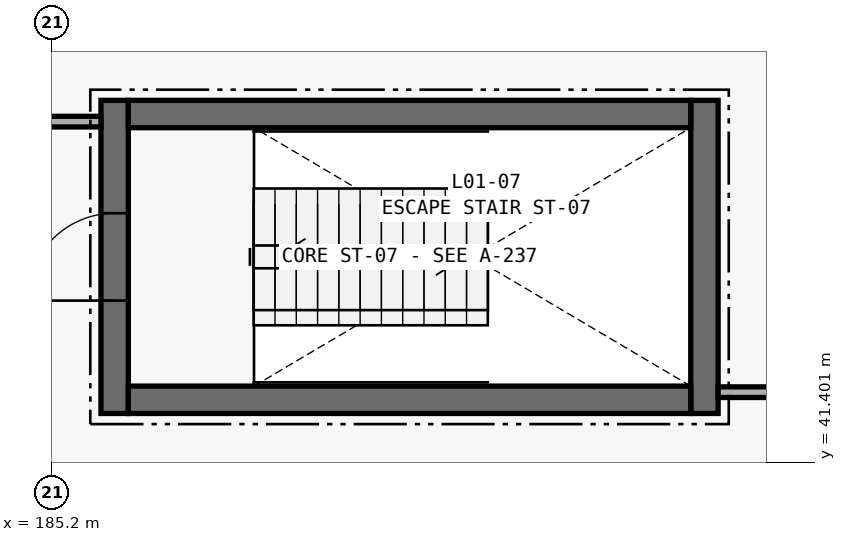
"""IFC4 building model, lengths in metres.
Left out: names, types, materials, properties, quantities, classifications, styles, units other than length and angle.
Written with IfcOpenShell. Run it as: python <this file> out.ifc"""

import sys

from ifc_helpers import new_model, si_unit, direction, frame, frame_2d, origin, place, context, subcontext, project, spatial, rectangle, extrude, element, fill, save


model = new_model("IFC4")
c1 = context("Model", 3, precision=1e-05, world=origin(), true_north=direction((0.0, 1.0)))
c2 = subcontext(c1, "Body", "Model", "MODEL_VIEW")
j1 = project(units=[si_unit("LENGTHUNIT", "METRE"), si_unit("PLANEANGLEUNIT", "RADIAN")], contexts=[c1])
p1 = place(None, origin())
s1 = spatial("IfcSite", under=j1, at=p1, CompositionType="ELEMENT")
p2 = place(p1, origin())
s2 = spatial("IfcBuilding", under=s1, at=p2, CompositionType="ELEMENT")
p3 = place(p2, frame((0.0, 0.0, 4.8)))
s3 = spatial("IfcBuildingStorey", under=s2, at=p3, CompositionType="ELEMENT", Elevation=4.8)
p4 = place(p3, frame((186.02, 42.04, 0.0), z_axis=(0.0, 0.0, 1.0), x_axis=(0.0, 1.0, 0.0)))
e1 = element("IfcWall", 1, at=p4, inside=s3, PredefinedType="SHEAR", context=c2, shape_type="SweptSolid", body=[
    extrude(rectangle(XDim=4.12, YDim=0.36, at=frame_2d((2.06, 0.0))), origin(), (0.0, 0.0, 1.0), 3.88),
])
p5 = place(p4, frame((1.485, 0.0, 0.0)))
e2 = element("IfcOpeningElement", 2, at=p5, cuts=e1, PredefinedType="OPENING", context=c2, shape_type="SweptSolid", body=[
    extrude(rectangle(XDim=1.15, YDim=2.15, at=frame_2d((0.575, 1.075))), frame((0.0, 0.195, 0.0), z_axis=(0.0, -1.0, 0.0), x_axis=(1.0, 0.0, 0.0)), (0.0, 0.0, 1.0), 0.39),
])
p6 = place(p3, frame((193.78, 42.04, 0.0), z_axis=(0.0, 0.0, 1.0), x_axis=(0.0, 1.0, 0.0)))
e3 = element("IfcWall", 3, at=p6, inside=s3, PredefinedType="SHEAR", context=c2, shape_type="SweptSolid", body=[
    extrude(rectangle(XDim=4.12, YDim=0.36, at=frame_2d((2.06, 0.0))), origin(), (0.0, 0.0, 1.0), 3.88),
])
for number, where, z_axis, x_axis in (
    (4, (186.2, 45.98, 0.0), (0.0, 0.0, 1.0), (1.0, 0.0, 0.0)),
    (5, (186.2, 42.22, 0.0), (0.0, 0.0, 1.0), (1.0, 0.0, 0.0)),
):
    element("IfcWall", number, at=place(p3, frame(where, z_axis=z_axis, x_axis=x_axis)), inside=s3, PredefinedType="SHEAR", context=c2, shape_type="SweptSolid", body=[
        extrude(rectangle(XDim=7.4, YDim=0.36, at=frame_2d((3.7, 0.0))), origin(), (0.0, 0.0, 1.0), 3.88),
    ])
p7 = place(p3, frame((193.96, 42.32, 0.0), z_axis=(0.0, 0.0, 1.0), x_axis=(1.0, 0.0, 0.0)))
e6 = element("IfcWall", 6, at=p7, inside=s3, PredefinedType="PARTITIONING", context=c2, shape_type="SweptSolid", body=[
    extrude(rectangle(XDim=13.145, YDim=0.14, at=frame_2d((6.573, 0.0))), origin(), (0.0, 0.0, 1.0), 2.76),
])
p8 = place(p7, frame((6.073, 0.0, 0.0)))
e7 = element("IfcOpeningElement", 7, at=p8, cuts=e6, PredefinedType="OPENING", context=c2, shape_type="SweptSolid", body=[
    extrude(rectangle(XDim=1.0, YDim=2.15, at=frame_2d((0.5, 1.075))), frame((0.0, 0.085, 0.0), z_axis=(0.0, -1.0, 0.0), x_axis=(1.0, 0.0, 0.0)), (0.0, 0.0, 1.0), 0.17),
])
p9 = place(p3, frame((181.85, 45.88, 0.0), z_axis=(0.0, 0.0, 1.0), x_axis=(1.0, 0.0, 0.0)))
e8 = element("IfcWall", 8, at=p9, inside=s3, PredefinedType="PARTITIONING", context=c2, shape_type="SweptSolid", body=[
    extrude(rectangle(XDim=3.99, YDim=0.14, at=frame_2d((1.995, 0.0))), origin(), (0.0, 0.0, 1.0), 2.76),
])
p10 = place(p5, origin())
e9 = element("IfcDoor", 9, at=p10, inside=s3, OperationType="SINGLE_SWING_LEFT", PredefinedType="DOOR", context=c2, shape_type="SweptSolid", body=[
    extrude(rectangle(XDim=1.15, YDim=2.15, at=frame_2d((0.575, 1.075))), frame((0.0, 0.025, 0.0), z_axis=(0.0, -1.0, 0.0), x_axis=(1.0, 0.0, 0.0)), (0.0, 0.0, 1.0), 0.05),
])
fill(e2, e9)
save(model, sys.argv[1])
